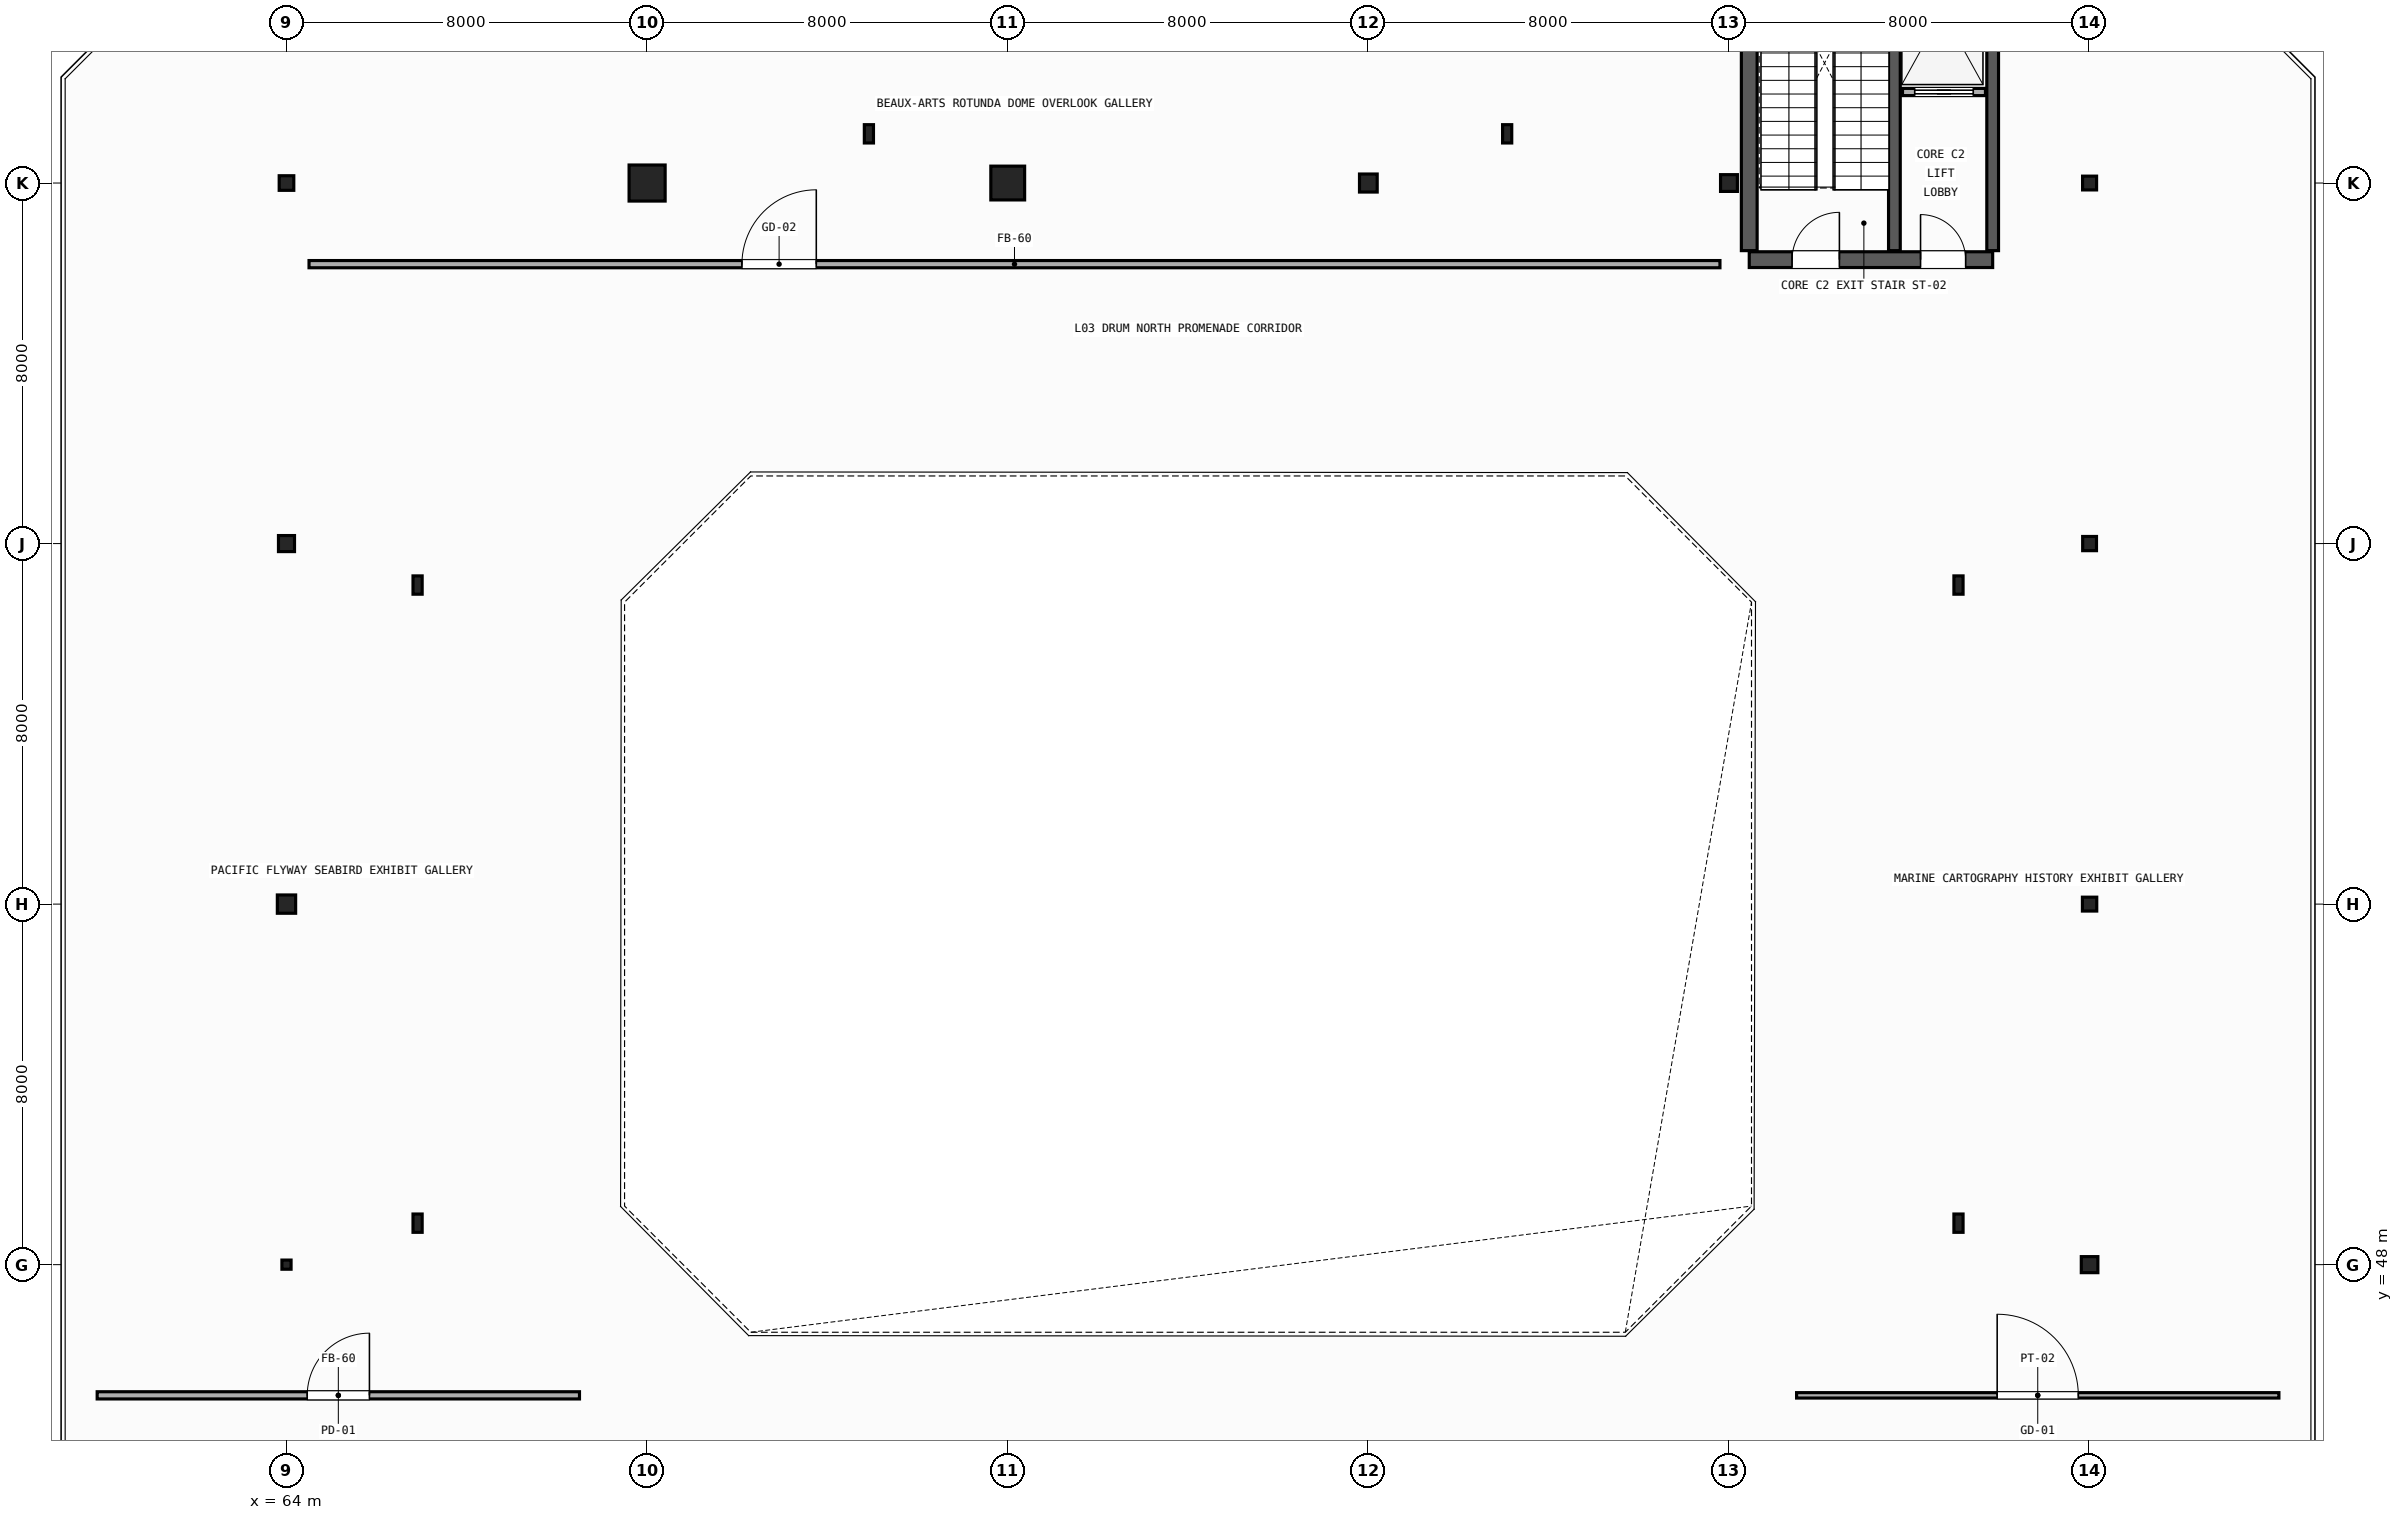
"""IFC4 building model, lengths in metres.
Left out: names, types, materials, properties, quantities, classifications, styles, units other than length and angle.
Written with IfcOpenShell. Run it as: python <this file> out.ifc"""

import sys

from ifc_helpers import new_model, si_unit, direction, frame, frame_2d, origin, origin_2d, place, context, subcontext, project, spatial, rectangle, hollow_rectangle, circle, hollow_circle, i_section, extrude, element, fill, save


model = new_model("IFC4")
c1 = context("Model", 3, precision=1e-05, world=origin(), true_north=direction((0.0, 1.0)))
c2 = subcontext(c1, "Body", "Model", "MODEL_VIEW")
j1 = project(units=[si_unit("LENGTHUNIT", "METRE"), si_unit("PLANEANGLEUNIT", "RADIAN")], contexts=[c1])
p1 = place(None, origin())
s1 = spatial("IfcSite", under=j1, at=p1, CompositionType="ELEMENT")
p2 = place(p1, origin())
s2 = spatial("IfcBuilding", under=s1, at=p2, CompositionType="ELEMENT")
p3 = place(p2, frame((0.0, 0.0, 15.0)))
s3 = spatial("IfcBuildingStorey", under=s2, at=p3, CompositionType="ELEMENT", Elevation=15.0)
p4 = place(p3, frame((64.0, 48.0, 0.0), z_axis=(0.0, 0.0, 1.0), x_axis=(0.0, 1.0, 0.0)))
e1 = element("IfcColumn", 1, at=p4, inside=s3, PredefinedType="COLUMN", context=c2, shape_type="SweptSolid", body=[
    extrude(hollow_rectangle(XDim=0.203, YDim=0.203, WallThickness=0.009, InnerFilletRadius=0.009, OuterFilletRadius=0.018, at=origin_2d()), origin(), (0.0, 0.0, 1.0), 4.56),
])
p5 = place(p3, frame((64.0, 56.0, 0.0), z_axis=(0.0, 0.0, 1.0), x_axis=(1.0, 0.0, 0.0)))
e2 = element("IfcColumn", 2, at=p5, inside=s3, PredefinedType="COLUMN", context=c2, shape_type="SweptSolid", body=[
    extrude(hollow_circle(Radius=0.203, WallThickness=0.012, at=origin_2d()), origin(), (0.0, 0.0, 1.0), 4.56),
])
p6 = place(p3, frame((64.0, 64.0, 0.0), z_axis=(0.0, 0.0, 1.0), x_axis=(0.0, 1.0, 0.0)))
e3 = element("IfcColumn", 3, at=p6, inside=s3, PredefinedType="COLUMN", context=c2, shape_type="SweptSolid", body=[
    extrude(hollow_circle(Radius=0.178, WallThickness=0.012, at=origin_2d()), origin(), (0.0, 0.0, 1.0), 4.56),
])
p7 = place(p3, frame((64.0, 72.0, 0.0), z_axis=(0.0, 0.0, 1.0), x_axis=(1.0, 0.0, 0.0)))
e4 = element("IfcColumn", 4, at=p7, inside=s3, PredefinedType="COLUMN", context=c2, shape_type="SweptSolid", body=[
    extrude(hollow_circle(Radius=0.162, WallThickness=0.012, at=origin_2d()), origin(), (0.0, 0.0, 1.0), 4.56),
])
p8 = place(p3, frame((72.0, 72.0, 0.0), z_axis=(0.0, 0.0, 1.0), x_axis=(0.0, 1.0, 0.0)))
e5 = element("IfcColumn", 5, at=p8, inside=s3, PredefinedType="COLUMN", context=c2, shape_type="SweptSolid", body=[
    extrude(rectangle(XDim=0.8, YDim=0.8, at=origin_2d()), origin(), (0.0, 0.0, 1.0), 4.56),
])
p9 = place(p3, frame((80.0, 72.0, 0.0), z_axis=(0.0, 0.0, 1.0), x_axis=(1.0, 0.0, 0.0)))
e6 = element("IfcColumn", 6, at=p9, inside=s3, PredefinedType="COLUMN", context=c2, shape_type="SweptSolid", body=[
    extrude(circle(Radius=0.375, at=origin_2d()), origin(), (0.0, 0.0, 1.0), 4.56),
])
p10 = place(p3, frame((88.0, 72.0, 0.0), z_axis=(0.0, 0.0, 1.0), x_axis=(0.0, 1.0, 0.0)))
e7 = element("IfcColumn", 7, at=p10, inside=s3, PredefinedType="COLUMN", context=c2, shape_type="SweptSolid", body=[
    extrude(i_section(OverallWidth=0.4, OverallDepth=0.393, WebThickness=0.023, FlangeThickness=0.037, FilletRadius=0.015, at=origin_2d()), origin(), (0.0, 0.0, 1.0), 4.56),
])
p11 = place(p3, frame((96.0, 72.0, 0.0), z_axis=(0.0, 0.0, 1.0), x_axis=(1.0, 0.0, 0.0)))
e8 = element("IfcColumn", 8, at=p11, inside=s3, PredefinedType="COLUMN", context=c2, shape_type="SweptSolid", body=[
    extrude(i_section(OverallWidth=0.374, OverallDepth=0.372, WebThickness=0.016, FlangeThickness=0.026, FilletRadius=0.015, at=origin_2d()), origin(), (0.0, 0.0, 1.0), 4.56),
])
p12 = place(p3, frame((104.0, 48.0, 0.0), z_axis=(0.0, 0.0, 1.0), x_axis=(1.0, 0.0, 0.0)))
e9 = element("IfcColumn", 9, at=p12, inside=s3, PredefinedType="COLUMN", context=c2, shape_type="SweptSolid", body=[
    extrude(i_section(OverallWidth=0.368, OverallDepth=0.356, WebThickness=0.011, FlangeThickness=0.018, FilletRadius=0.015, at=origin_2d()), origin(), (0.0, 0.0, 1.0), 4.56),
])
p13 = place(p3, frame((104.0, 56.0, 0.0), z_axis=(0.0, 0.0, 1.0), x_axis=(0.0, 1.0, 0.0)))
e10 = element("IfcColumn", 10, at=p13, inside=s3, PredefinedType="COLUMN", context=c2, shape_type="SweptSolid", body=[
    extrude(i_section(OverallWidth=0.308, OverallDepth=0.318, WebThickness=0.013, FlangeThickness=0.021, FilletRadius=0.013, at=origin_2d()), origin(), (0.0, 0.0, 1.0), 4.56),
])
p14 = place(p3, frame((104.0, 64.0, 0.0), z_axis=(0.0, 0.0, 1.0), x_axis=(1.0, 0.0, 0.0)))
e11 = element("IfcColumn", 11, at=p14, inside=s3, PredefinedType="COLUMN", context=c2, shape_type="SweptSolid", body=[
    extrude(i_section(OverallWidth=0.307, OverallDepth=0.315, WebThickness=0.012, FlangeThickness=0.019, FilletRadius=0.013, at=origin_2d()), origin(), (0.0, 0.0, 1.0), 4.56),
])
p15 = place(p3, frame((104.0, 72.0, 0.0), z_axis=(0.0, 0.0, 1.0), x_axis=(0.0, 1.0, 0.0)))
e12 = element("IfcColumn", 12, at=p15, inside=s3, PredefinedType="COLUMN", context=c2, shape_type="SweptSolid", body=[
    extrude(i_section(OverallWidth=0.306, OverallDepth=0.311, WebThickness=0.011, FlangeThickness=0.017, FilletRadius=0.013, at=origin_2d()), origin(), (0.0, 0.0, 1.0), 4.56),
])
for number, where, z_axis, x_axis in (
    (13, (101.092, 63.08, 0.0), (0.0, 0.0, 1.0), (1.0, 0.0, 0.0)),
    (14, (91.08, 73.092, 0.0), (0.0, 0.0, 1.0), (1.0, 0.0, 0.0)),
    (15, (76.92, 73.092, 0.0), (0.0, 0.0, 1.0), (1.0, 0.0, 0.0)),
    (16, (66.908, 63.08, 0.0), (0.0, 0.0, 1.0), (1.0, 0.0, 0.0)),
    (17, (66.908, 48.92, 0.0), (0.0, 0.0, 1.0), (1.0, 0.0, 0.0)),
    (18, (101.092, 48.92, 0.0), (0.0, 0.0, 1.0), (1.0, 0.0, 0.0)),
):
    element("IfcColumn", number, at=place(p3, frame(where, z_axis=z_axis, x_axis=x_axis)), inside=s3, PredefinedType="COLUMN", context=c2, shape_type="SweptSolid", body=[
        extrude(hollow_rectangle(XDim=0.203, YDim=0.406, WallThickness=0.012, InnerFilletRadius=0.012, OuterFilletRadius=0.024, at=origin_2d()), origin(), (0.0, 0.0, 1.0), 4.54),
    ])
p16 = place(p3, frame((96.45, 70.3, 0.0), z_axis=(0.0, 0.0, 1.0), x_axis=(1.0, 0.0, 0.0)))
e19 = element("IfcWall", 19, at=p16, inside=s3, PredefinedType="SHEAR", context=c2, shape_type="SweptSolid", body=[
    extrude(rectangle(XDim=5.4, YDim=0.35, at=frame_2d((2.7, 0.0))), origin(), (0.0, 0.0, 1.0), 4.55),
])
p17 = place(p16, frame((0.95, 0.0, 0.0)))
e20 = element("IfcOpeningElement", 20, at=p17, cuts=e19, PredefinedType="OPENING", context=c2, shape_type="SweptSolid", body=[
    extrude(rectangle(XDim=1.05, YDim=2.1, at=frame_2d((0.525, 1.05))), frame((0.0, 0.185, 0.0), z_axis=(0.0, -1.0, 0.0), x_axis=(1.0, 0.0, 0.0)), (0.0, 0.0, 1.0), 0.37),
])
p18 = place(p16, frame((3.8, 0.0, 0.0)))
e21 = element("IfcOpeningElement", 21, at=p18, cuts=e19, PredefinedType="OPENING", context=c2, shape_type="SweptSolid", body=[
    extrude(rectangle(XDim=1.0, YDim=2.15, at=frame_2d((0.5, 1.075))), frame((0.0, 0.185, 0.0), z_axis=(0.0, -1.0, 0.0), x_axis=(1.0, 0.0, 0.0)), (0.0, 0.0, 1.0), 0.37),
])
p19 = place(p3, frame((96.45, 70.5, 0.0), z_axis=(0.0, 0.0, 1.0), x_axis=(0.0, 1.0, 0.0)))
e22 = element("IfcWall", 22, at=p19, inside=s3, PredefinedType="SHEAR", context=c2, shape_type="SweptSolid", body=[
    extrude(rectangle(XDim=6.95, YDim=0.35, at=frame_2d((3.475, 0.0))), origin(), (0.0, 0.0, 1.0), 4.55),
])
for number, where, z_axis, x_axis in (
    (23, (101.85, 70.5, 0.0), (0.0, 0.0, 1.0), (0.0, 1.0, 0.0)),
    (24, (99.67, 70.5, 0.0), (0.0, 0.0, 1.0), (0.0, 1.0, 0.0)),
):
    element("IfcWall", number, at=place(p3, frame(where, z_axis=z_axis, x_axis=x_axis)), inside=s3, PredefinedType="SHEAR", context=c2, shape_type="SweptSolid", body=[
        extrude(rectangle(XDim=6.95, YDim=0.26, at=frame_2d((3.475, 0.0))), origin(), (0.0, 0.0, 1.0), 4.55),
    ])
p20 = place(p3, frame((99.85, 74.02, 0.0), z_axis=(0.0, 0.0, 1.0), x_axis=(1.0, 0.0, 0.0)))
e25 = element("IfcWall", 25, at=p20, inside=s3, PredefinedType="PARTITIONING", context=c2, shape_type="SweptSolid", body=[
    extrude(rectangle(XDim=1.84, YDim=0.16, at=frame_2d((0.92, 0.0))), origin(), (0.0, 0.0, 1.0), 3.6),
])
p21 = place(p20, frame((0.27, 0.0, 0.0)))
e26 = element("IfcOpeningElement", 26, at=p21, cuts=e25, PredefinedType="OPENING", context=c2, shape_type="SweptSolid", body=[
    extrude(rectangle(XDim=1.3, YDim=2.2, at=frame_2d((0.65, 1.1))), frame((0.0, 0.09, 0.0), z_axis=(0.0, -1.0, 0.0), x_axis=(1.0, 0.0, 0.0)), (0.0, 0.0, 1.0), 0.18),
])
p22 = place(p3, frame((59.8, 45.1, 0.0), z_axis=(0.0, 0.0, 1.0), x_axis=(1.0, 0.0, 0.0)))
e27 = element("IfcWall", 27, at=p22, inside=s3, PredefinedType="PARTITIONING", context=c2, shape_type="SweptSolid", body=[
    extrude(rectangle(XDim=10.7, YDim=0.16, at=frame_2d((5.35, 0.0))), origin(), (0.0, 0.0, 1.0), 3.767),
])
p23 = place(p22, frame((4.66, 0.0, 0.0)))
e28 = element("IfcOpeningElement", 28, at=p23, cuts=e27, PredefinedType="OPENING", context=c2, shape_type="SweptSolid", body=[
    extrude(rectangle(XDim=1.38, YDim=2.25, at=frame_2d((0.69, 1.125))), frame((0.0, 0.09, 0.0), z_axis=(0.0, -1.0, 0.0), x_axis=(1.0, 0.0, 0.0)), (0.0, 0.0, 1.0), 0.18),
])
p24 = place(p3, frame((97.5, 45.1, 0.0), z_axis=(0.0, 0.0, 1.0), x_axis=(1.0, 0.0, 0.0)))
e29 = element("IfcWall", 29, at=p24, inside=s3, PredefinedType="PARTITIONING", context=c2, shape_type="SweptSolid", body=[
    extrude(rectangle(XDim=10.7, YDim=0.12, at=frame_2d((5.35, 0.0))), origin(), (0.0, 0.0, 1.0), 3.918),
])
p25 = place(p24, frame((4.45, 0.0, 0.0)))
e30 = element("IfcOpeningElement", 30, at=p25, cuts=e29, PredefinedType="OPENING", context=c2, shape_type="SweptSolid", body=[
    extrude(rectangle(XDim=1.8, YDim=2.4, at=frame_2d((0.9, 1.2))), frame((0.0, 0.07, 0.0), z_axis=(0.0, -1.0, 0.0), x_axis=(1.0, 0.0, 0.0)), (0.0, 0.0, 1.0), 0.14),
])
p26 = place(p3, frame((64.5, 70.2, 0.0), z_axis=(0.0, 0.0, 1.0), x_axis=(1.0, 0.0, 0.0)))
e31 = element("IfcWall", 31, at=p26, inside=s3, PredefinedType="PARTITIONING", context=c2, shape_type="SweptSolid", body=[
    extrude(rectangle(XDim=31.3, YDim=0.16, at=frame_2d((15.65, 0.0))), origin(), (0.0, 0.0, 1.0), 4.29),
])
p27 = place(p26, frame((9.603, 0.0, 0.0)))
e32 = element("IfcOpeningElement", 32, at=p27, cuts=e31, PredefinedType="OPENING", context=c2, shape_type="SweptSolid", body=[
    extrude(rectangle(XDim=1.65, YDim=2.35, at=frame_2d((0.825, 1.175))), frame((0.0, 0.09, 0.0), z_axis=(0.0, -1.0, 0.0), x_axis=(1.0, 0.0, 0.0)), (0.0, 0.0, 1.0), 0.18),
])
p28 = place(p21, origin())
e33 = element("IfcDoor", 33, at=p28, inside=s3, OperationType="SLIDING_TO_LEFT", PredefinedType="DOOR", context=c2, shape_type="SweptSolid", body=[
    extrude(rectangle(XDim=1.3, YDim=2.2, at=frame_2d((0.65, 1.1))), frame((0.0, 0.025, 0.0), z_axis=(0.0, -1.0, 0.0), x_axis=(1.0, 0.0, 0.0)), (0.0, 0.0, 1.0), 0.05),
])
fill(e26, e33)
p29 = place(p17, origin())
e34 = element("IfcDoor", 34, at=p29, inside=s3, OperationType="SINGLE_SWING_RIGHT", PredefinedType="DOOR", context=c2, shape_type="SweptSolid", body=[
    extrude(rectangle(XDim=1.05, YDim=2.1, at=frame_2d((0.525, 1.05))), frame((0.0, 0.025, 0.0), z_axis=(0.0, -1.0, 0.0), x_axis=(1.0, 0.0, 0.0)), (0.0, 0.0, 1.0), 0.05),
])
fill(e20, e34)
p30 = place(p18, origin())
e35 = element("IfcDoor", 35, at=p30, inside=s3, OperationType="SINGLE_SWING_LEFT", PredefinedType="DOOR", context=c2, shape_type="SweptSolid", body=[
    extrude(rectangle(XDim=1.0, YDim=2.15, at=frame_2d((0.5, 1.075))), frame((0.0, 0.025, 0.0), z_axis=(0.0, -1.0, 0.0), x_axis=(1.0, 0.0, 0.0)), (0.0, 0.0, 1.0), 0.05),
])
fill(e21, e35)
p31 = place(p23, origin())
e36 = element("IfcDoor", 36, at=p31, inside=s3, OperationType="SINGLE_SWING_RIGHT", PredefinedType="DOOR", context=c2, shape_type="SweptSolid", body=[
    extrude(rectangle(XDim=1.38, YDim=2.25, at=frame_2d((0.69, 1.125))), frame((0.0, 0.025, 0.0), z_axis=(0.0, -1.0, 0.0), x_axis=(1.0, 0.0, 0.0)), (0.0, 0.0, 1.0), 0.05),
])
fill(e28, e36)
p32 = place(p25, origin())
e37 = element("IfcDoor", 37, at=p32, inside=s3, OperationType="SINGLE_SWING_LEFT", PredefinedType="DOOR", context=c2, shape_type="SweptSolid", body=[
    extrude(rectangle(XDim=1.8, YDim=2.4, at=frame_2d((0.9, 1.2))), frame((0.0, 0.025, 0.0), z_axis=(0.0, -1.0, 0.0), x_axis=(1.0, 0.0, 0.0)), (0.0, 0.0, 1.0), 0.05),
])
fill(e30, e37)
p33 = place(p27, origin())
e38 = element("IfcDoor", 38, at=p33, inside=s3, OperationType="SINGLE_SWING_RIGHT", PredefinedType="DOOR", context=c2, shape_type="SweptSolid", body=[
    extrude(rectangle(XDim=1.65, YDim=2.35, at=frame_2d((0.825, 1.175))), frame((0.0, 0.025, 0.0), z_axis=(0.0, -1.0, 0.0), x_axis=(1.0, 0.0, 0.0)), (0.0, 0.0, 1.0), 0.05),
])
fill(e32, e38)
save(model, sys.argv[1])
